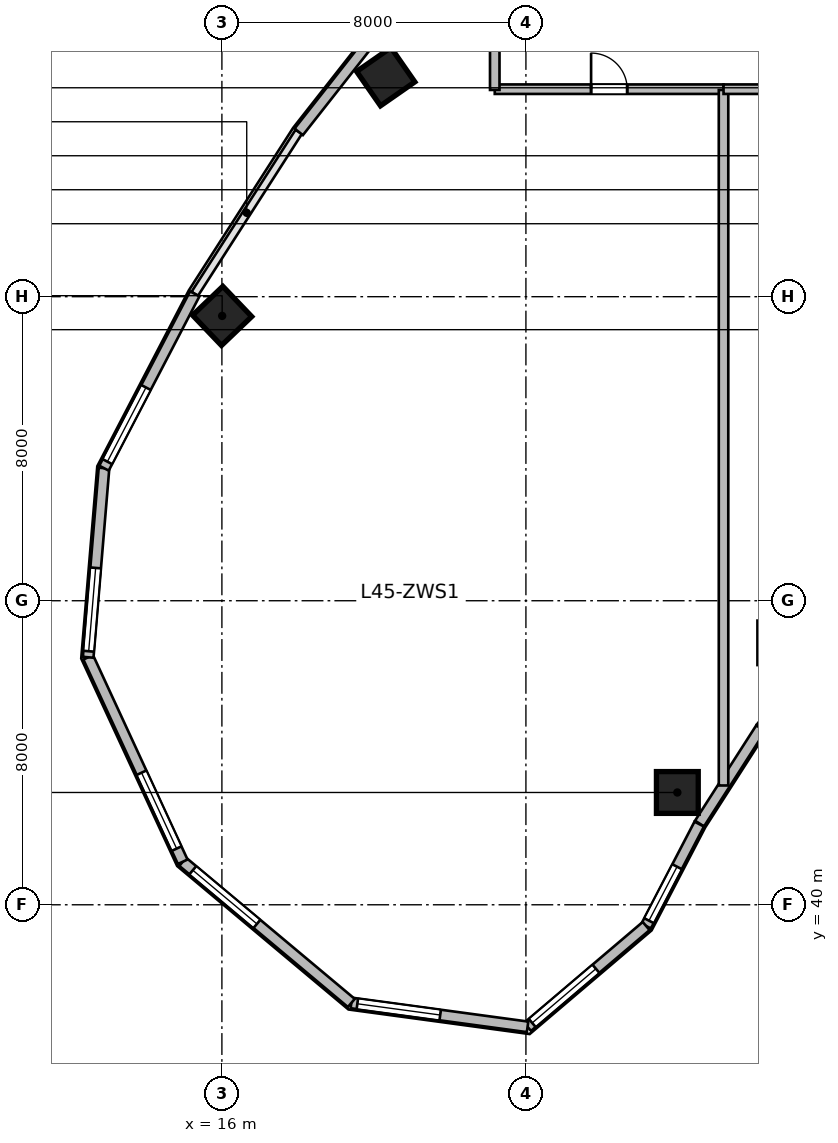
"""IFC4 building model, lengths in metres.
Left out: names, types, materials, properties, quantities, classifications, styles, units other than length and angle.
Written with IfcOpenShell. Run it as: python <this file> out.ifc"""

import sys

from ifc_helpers import new_model, si_unit, direction, frame, frame_2d, origin, origin_2d, place, context, subcontext, project, spatial, rectangle, circle, extrude, source, transform, mapped, element, fill, save


model = new_model("IFC4")
c1 = context("Model", 3, precision=1e-05, world=origin(), true_north=direction((0.0, 1.0)))
c2 = subcontext(c1, "Body", "Model", "MODEL_VIEW")
j1 = project(units=[si_unit("LENGTHUNIT", "METRE"), si_unit("PLANEANGLEUNIT", "RADIAN")], contexts=[c1])
p1 = place(None, origin())
s1 = spatial("IfcSite", under=j1, at=p1, CompositionType="ELEMENT")
p2 = place(p1, origin())
s2 = spatial("IfcBuilding", under=s1, at=p2, CompositionType="ELEMENT")
p3 = place(p2, frame((0.0, 0.0, 185.7)))
s3 = spatial("IfcBuildingStorey", under=s2, at=p3, CompositionType="ELEMENT", Elevation=185.7)
m1 = source(origin(), c2, "Body", "SweptSolid", [
    extrude(circle(Radius=0.55, at=origin_2d()), origin(), (0.0, 0.0, 1.0), 3.9),
])
p4 = place(p3, frame((27.985, 42.955, 0.0), z_axis=(0.0, 0.0, 1.0), x_axis=(-0.690756218984, 0.723087716626, 0.0)))
e1 = element("IfcColumn", 1, at=p4, inside=s3, PredefinedType="COLUMN", context=c2, shape_type="MappedRepresentation", body=[
    mapped(m1, transform((0.0, 0.0, 0.0), scale=1.0)),
])
m2 = source(origin(), c2, "Body", "SweptSolid", [
    extrude(rectangle(XDim=1.1, YDim=1.1, at=origin_2d()), origin(), (0.0, 0.0, 1.0), 3.9),
])
for number, where, z_axis, x_axis in (
    (2, (16.007, 55.494, 0.0), (0.0, 0.0, 1.0), (-0.691, 0.723, 0.0)),
    (3, (20.311, 61.789, 0.0), (0.0, 0.0, 1.0), (-0.571, 0.821, 0.0)),
):
    element("IfcColumn", number, at=place(p3, frame(where, z_axis=z_axis, x_axis=x_axis)), inside=s3, PredefinedType="COLUMN", context=c2, shape_type="MappedRepresentation", body=[
        mapped(m2, transform((0.0, 0.0, 0.0), scale=1.0)),
    ])
m3 = source(origin(), c2, "Body", "SweptSolid", [
    extrude(rectangle(XDim=2.897, YDim=0.28, at=frame_2d((1.448, 0.0))), origin(), (0.0, 0.0, 1.0), 3.58),
])
p5 = place(p3, frame((31.979, 46.936, 0.0), z_axis=(0.0, 0.0, 1.0), x_axis=(-0.618167636915, -0.786046291685, 0.0)))
e4 = element("IfcWall", 4, at=p5, inside=s3, PredefinedType="SOLIDWALL", context=c2, shape_type="MappedRepresentation", body=[
    mapped(m3, transform((0.0, 0.0, 0.0), scale=1.0)),
])
m4 = source(origin(), c2, "Body", "SweptSolid", [
    extrude(rectangle(XDim=2.981, YDim=0.28, at=frame_2d((1.49, 0.0))), origin(), (0.0, 0.0, 1.0), 3.58),
])
p6 = place(p3, frame((30.179, 44.645, 0.0), z_axis=(0.0, 0.0, 1.0), x_axis=(-0.540194451908, -0.841540227278, 0.0)))
e5 = element("IfcWall", 5, at=p6, inside=s3, PredefinedType="SOLIDWALL", context=c2, shape_type="MappedRepresentation", body=[
    mapped(m4, transform((0.0, 0.0, 0.0), scale=1.0)),
])
m5 = source(origin(), c2, "Body", "SweptSolid", [
    extrude(rectangle(XDim=3.024, YDim=0.28, at=frame_2d((1.512, 0.0))), origin(), (0.0, 0.0, 1.0), 3.58),
])
p7 = place(p3, frame((28.561, 42.123, 0.0), z_axis=(0.0, 0.0, 1.0), x_axis=(-0.461718746531, -0.887026380161, 0.0)))
e6 = element("IfcWall", 6, at=p7, inside=s3, PredefinedType="SOLIDWALL", context=c2, shape_type="MappedRepresentation", body=[
    mapped(m5, transform((0.0, 0.0, 0.0), scale=1.0)),
])
p8 = place(p7, frame((1.264, 0.0, 0.95)))
e7 = element("IfcOpeningElement", 7, at=p8, cuts=e6, PredefinedType="OPENING", context=c2, shape_type="SweptSolid", body=[
    extrude(rectangle(XDim=1.6, YDim=1.9, at=frame_2d((0.8, 0.95))), frame((0.0, 0.15, 0.0), z_axis=(0.0, -1.0, 0.0), x_axis=(1.0, 0.0, 0.0)), (0.0, 0.0, 1.0), 0.3),
])
m6 = source(origin(), c2, "Body", "SweptSolid", [
    extrude(rectangle(XDim=4.096, YDim=0.28, at=frame_2d((2.048, 0.0))), origin(), (0.0, 0.0, 1.0), 3.58),
])
p9 = place(p3, frame((27.164, 39.44, 0.0), z_axis=(0.0, 0.0, 1.0), x_axis=(-0.761926081737, -0.647663991564, 0.0)))
e8 = element("IfcWall", 8, at=p9, inside=s3, PredefinedType="SOLIDWALL", context=c2, shape_type="MappedRepresentation", body=[
    mapped(m6, transform((0.0, 0.0, 0.0), scale=1.0)),
])
p10 = place(p9, frame((1.736, 0.0, 0.95)))
e9 = element("IfcOpeningElement", 9, at=p10, cuts=e8, PredefinedType="OPENING", context=c2, shape_type="SweptSolid", body=[
    extrude(rectangle(XDim=2.2, YDim=2.1, at=frame_2d((1.1, 1.05))), frame((0.0, 0.15, 0.0), z_axis=(0.0, -1.0, 0.0), x_axis=(1.0, 0.0, 0.0)), (0.0, 0.0, 1.0), 0.3),
])
m7 = source(origin(), c2, "Body", "SweptSolid", [
    extrude(rectangle(XDim=4.68, YDim=0.28, at=frame_2d((2.34, 0.0))), origin(), (0.0, 0.0, 1.0), 3.58),
])
p11 = place(p3, frame((24.043, 36.788, 0.0), z_axis=(0.0, 0.0, 1.0), x_axis=(-0.990931146435, 0.134370618162, 0.0)))
e10 = element("IfcWall", 10, at=p11, inside=s3, PredefinedType="SOLIDWALL", context=c2, shape_type="MappedRepresentation", body=[
    mapped(m7, transform((0.0, 0.0, 0.0), scale=1.0)),
])
p12 = place(p11, frame((2.32, 0.0, 0.95)))
e11 = element("IfcOpeningElement", 11, at=p12, cuts=e10, PredefinedType="OPENING", context=c2, shape_type="SweptSolid", body=[
    extrude(rectangle(XDim=2.2, YDim=2.1, at=frame_2d((1.1, 1.05))), frame((0.0, 0.15, 0.0), z_axis=(0.0, -1.0, 0.0), x_axis=(1.0, 0.0, 0.0)), (0.0, 0.0, 1.0), 0.3),
])
m8 = source(origin(), c2, "Body", "SweptSolid", [
    extrude(rectangle(XDim=5.786, YDim=0.28, at=frame_2d((2.893, 0.0))), origin(), (0.0, 0.0, 1.0), 3.58),
])
p13 = place(p3, frame((19.406, 37.417, 0.0), z_axis=(0.0, 0.0, 1.0), x_axis=(-0.766711306852, 0.641992034176, 0.0)))
e12 = element("IfcWall", 12, at=p13, inside=s3, PredefinedType="SOLIDWALL", context=c2, shape_type="MappedRepresentation", body=[
    mapped(m8, transform((0.0, 0.0, 0.0), scale=1.0)),
])
p14 = place(p13, frame((3.24, 0.0, 0.95)))
e13 = element("IfcOpeningElement", 13, at=p14, cuts=e12, PredefinedType="OPENING", context=c2, shape_type="SweptSolid", body=[
    extrude(rectangle(XDim=2.2, YDim=2.1, at=frame_2d((1.1, 1.05))), frame((0.0, 0.15, 0.0), z_axis=(0.0, -1.0, 0.0), x_axis=(1.0, 0.0, 0.0)), (0.0, 0.0, 1.0), 0.3),
])
m9 = source(origin(), c2, "Body", "SweptSolid", [
    extrude(rectangle(XDim=5.927, YDim=0.28, at=frame_2d((2.964, 0.0))), origin(), (0.0, 0.0, 1.0), 3.58),
])
p15 = place(p3, frame((14.969, 41.131, 0.0), z_axis=(0.0, 0.0, 1.0), x_axis=(-0.419656204795, 0.907683132914, 0.0)))
e14 = element("IfcWall", 14, at=p15, inside=s3, PredefinedType="SOLIDWALL", context=c2, shape_type="MappedRepresentation", body=[
    mapped(m9, transform((0.0, 0.0, 0.0), scale=1.0)),
])
p16 = place(p15, frame((0.382, 0.0, 0.95)))
e15 = element("IfcOpeningElement", 15, at=p16, cuts=e14, PredefinedType="OPENING", context=c2, shape_type="SweptSolid", body=[
    extrude(rectangle(XDim=2.2, YDim=2.1, at=frame_2d((1.1, 1.05))), frame((0.0, 0.15, 0.0), z_axis=(0.0, -1.0, 0.0), x_axis=(1.0, 0.0, 0.0)), (0.0, 0.0, 1.0), 0.3),
])
m10 = source(origin(), c2, "Body", "SweptSolid", [
    extrude(rectangle(XDim=4.994, YDim=0.28, at=frame_2d((2.497, 0.0))), origin(), (0.0, 0.0, 1.0), 3.58),
])
p17 = place(p3, frame((12.481, 46.512, 0.0), z_axis=(0.0, 0.0, 1.0), x_axis=(0.083344839916, 0.996520766296, 0.0)))
e16 = element("IfcWall", 16, at=p17, inside=s3, PredefinedType="SOLIDWALL", context=c2, shape_type="MappedRepresentation", body=[
    mapped(m10, transform((0.0, 0.0, 0.0), scale=1.0)),
])
p18 = place(p17, frame((0.16, 0.0, 0.95)))
e17 = element("IfcOpeningElement", 17, at=p18, cuts=e16, PredefinedType="OPENING", context=c2, shape_type="SweptSolid", body=[
    extrude(rectangle(XDim=2.2, YDim=2.1, at=frame_2d((1.1, 1.05))), frame((0.0, 0.15, 0.0), z_axis=(0.0, -1.0, 0.0), x_axis=(1.0, 0.0, 0.0)), (0.0, 0.0, 1.0), 0.3),
])
m11 = source(origin(), c2, "Body", "SweptSolid", [
    extrude(rectangle(XDim=5.171, YDim=0.28, at=frame_2d((2.585, 0.0))), origin(), (0.0, 0.0, 1.0), 3.58),
])
p19 = place(p3, frame((12.898, 51.489, 0.0), z_axis=(0.0, 0.0, 1.0), x_axis=(0.461752581363, 0.887008767491, 0.0)))
e18 = element("IfcWall", 18, at=p19, inside=s3, PredefinedType="SOLIDWALL", context=c2, shape_type="MappedRepresentation", body=[
    mapped(m11, transform((0.0, 0.0, 0.0), scale=1.0)),
])
p20 = place(p19, frame((0.193, 0.0, 0.95)))
e19 = element("IfcOpeningElement", 19, at=p20, cuts=e18, PredefinedType="OPENING", context=c2, shape_type="SweptSolid", body=[
    extrude(rectangle(XDim=2.2, YDim=2.1, at=frame_2d((1.1, 1.05))), frame((0.0, 0.15, 0.0), z_axis=(0.0, -1.0, 0.0), x_axis=(1.0, 0.0, 0.0)), (0.0, 0.0, 1.0), 0.3),
])
m12 = source(origin(), c2, "Body", "SweptSolid", [
    extrude(rectangle(XDim=4.922, YDim=0.28, at=frame_2d((2.461, 0.0))), origin(), (0.0, 0.0, 1.0), 3.58),
])
p21 = place(p3, frame((18.021, 60.338, 0.0), z_axis=(0.0, 0.0, 1.0), x_axis=(0.61817639101, 0.786039407153, 0.0)))
e20 = element("IfcWall", 20, at=p21, inside=s3, PredefinedType="SOLIDWALL", context=c2, shape_type="MappedRepresentation", body=[
    mapped(m12, transform((0.0, 0.0, 0.0), scale=1.0)),
])
m13 = source(origin(), c2, "Body", "SweptSolid", [
    extrude(rectangle(XDim=6.02, YDim=0.25, at=frame_2d((3.01, 0.0))), origin(), (0.0, 0.0, 1.0), 3.58),
])
p22 = place(p3, frame((23.18, 61.46, 0.0), z_axis=(0.0, 0.0, 1.0), x_axis=(1.0, 0.0, 0.0)))
e21 = element("IfcWall", 21, at=p22, inside=s3, PredefinedType="PARTITIONING", context=c2, shape_type="MappedRepresentation", body=[
    mapped(m13, transform((0.0, 0.0, 0.0), scale=1.0)),
])
p23 = place(p22, frame((2.535, 0.0, 0.0)))
e22 = element("IfcOpeningElement", 22, at=p23, cuts=e21, PredefinedType="OPENING", context=c2, shape_type="SweptSolid", body=[
    extrude(rectangle(XDim=0.95, YDim=2.1, at=frame_2d((0.475, 1.05))), frame((0.0, 0.135, 0.0), z_axis=(0.0, -1.0, 0.0), x_axis=(1.0, 0.0, 0.0)), (0.0, 0.0, 1.0), 0.27),
])
m14 = source(origin(), c2, "Body", "SweptSolid", [
    extrude(rectangle(XDim=18.301, YDim=0.25, at=frame_2d((9.15, 0.0))), origin(), (0.0, 0.0, 1.0), 2.872),
])
p24 = place(p3, frame((29.2, 43.139, 0.0), z_axis=(0.0, 0.0, 1.0), x_axis=(0.0, 1.0, 0.0)))
e23 = element("IfcWall", 23, at=p24, inside=s3, PredefinedType="PARTITIONING", context=c2, shape_type="MappedRepresentation", body=[
    mapped(m14, transform((0.0, 0.0, 0.0), scale=1.0)),
])
m15 = source(origin(), c2, "Body", "SweptSolid", [
    extrude(rectangle(XDim=5.2, YDim=0.25, at=frame_2d((2.6, 0.0))), origin(), (0.0, 0.0, 1.0), 3.58),
])
p25 = place(p3, frame((29.2, 61.46, 0.0), z_axis=(0.0, 0.0, 1.0), x_axis=(1.0, 0.0, 0.0)))
e24 = element("IfcWall", 24, at=p25, inside=s3, PredefinedType="PARTITIONING", context=c2, shape_type="MappedRepresentation", body=[
    mapped(m15, transform((0.0, 0.0, 0.0), scale=1.0)),
])
p26 = place(p25, frame((2.125, 0.0, 0.0)))
e25 = element("IfcOpeningElement", 25, at=p26, cuts=e24, PredefinedType="OPENING", context=c2, shape_type="SweptSolid", body=[
    extrude(rectangle(XDim=0.95, YDim=2.1, at=frame_2d((0.475, 1.05))), frame((0.0, 0.135, 0.0), z_axis=(0.0, -1.0, 0.0), x_axis=(1.0, 0.0, 0.0)), (0.0, 0.0, 1.0), 0.27),
])
m16 = source(origin(), c2, "Body", "SweptSolid", [
    extrude(rectangle(XDim=2.62, YDim=0.25, at=frame_2d((1.31, 0.0))), origin(), (0.0, 0.0, 1.0), 3.58),
])
p27 = place(p3, frame((23.18, 61.44, 0.0), z_axis=(0.0, 0.0, 1.0), x_axis=(0.0, 1.0, 0.0)))
e26 = element("IfcWall", 26, at=p27, inside=s3, PredefinedType="PARTITIONING", context=c2, shape_type="MappedRepresentation", body=[
    mapped(m16, transform((0.0, 0.0, 0.0), scale=1.0)),
])
m17 = source(origin(), c2, "Body", "SweptSolid", [
    extrude(rectangle(XDim=1.6, YDim=1.9, at=frame_2d((0.8, 0.95))), frame((0.0, 0.03, 0.0), z_axis=(0.0, -1.0, 0.0), x_axis=(1.0, 0.0, 0.0)), (0.0, 0.0, 1.0), 0.06),
])
p28 = place(p8, origin())
e27 = element("IfcWindow", 27, at=p28, inside=s3, PartitioningType="SINGLE_PANEL", PredefinedType="WINDOW", context=c2, shape_type="MappedRepresentation", body=[
    mapped(m17, transform((0.0, 0.0, 0.0), scale=1.0)),
])
fill(e7, e27)
m18 = source(origin(), c2, "Body", "SweptSolid", [
    extrude(rectangle(XDim=2.2, YDim=2.1, at=frame_2d((1.1, 1.05))), frame((0.0, 0.03, 0.0), z_axis=(0.0, -1.0, 0.0), x_axis=(1.0, 0.0, 0.0)), (0.0, 0.0, 1.0), 0.06),
])
p29 = place(p10, origin())
e28 = element("IfcWindow", 28, at=p29, inside=s3, PartitioningType="TRIPLE_PANEL_VERTICAL", PredefinedType="WINDOW", context=c2, shape_type="MappedRepresentation", body=[
    mapped(m18, transform((0.0, 0.0, 0.0), scale=1.0)),
])
fill(e9, e28)
p30 = place(p12, origin())
e29 = element("IfcWindow", 29, at=p30, inside=s3, PartitioningType="TRIPLE_PANEL_VERTICAL", PredefinedType="WINDOW", context=c2, shape_type="MappedRepresentation", body=[
    mapped(m18, transform((0.0, 0.0, 0.0), scale=1.0)),
])
fill(e11, e29)
p31 = place(p14, origin())
e30 = element("IfcWindow", 30, at=p31, inside=s3, PartitioningType="TRIPLE_PANEL_VERTICAL", PredefinedType="WINDOW", context=c2, shape_type="MappedRepresentation", body=[
    mapped(m18, transform((0.0, 0.0, 0.0), scale=1.0)),
])
fill(e13, e30)
p32 = place(p16, origin())
e31 = element("IfcWindow", 31, at=p32, inside=s3, PartitioningType="TRIPLE_PANEL_VERTICAL", PredefinedType="WINDOW", context=c2, shape_type="MappedRepresentation", body=[
    mapped(m18, transform((0.0, 0.0, 0.0), scale=1.0)),
])
fill(e15, e31)
p33 = place(p18, origin())
e32 = element("IfcWindow", 32, at=p33, inside=s3, PartitioningType="TRIPLE_PANEL_VERTICAL", PredefinedType="WINDOW", context=c2, shape_type="MappedRepresentation", body=[
    mapped(m18, transform((0.0, 0.0, 0.0), scale=1.0)),
])
fill(e17, e32)
p34 = place(p20, origin())
e33 = element("IfcWindow", 33, at=p34, inside=s3, PartitioningType="TRIPLE_PANEL_VERTICAL", PredefinedType="WINDOW", context=c2, shape_type="MappedRepresentation", body=[
    mapped(m18, transform((0.0, 0.0, 0.0), scale=1.0)),
])
fill(e19, e33)
m19 = source(origin(), c2, "Body", "SweptSolid", [
    extrude(rectangle(XDim=0.95, YDim=2.1, at=frame_2d((0.475, 1.05))), frame((0.0, 0.025, 0.0), z_axis=(0.0, -1.0, 0.0), x_axis=(1.0, 0.0, 0.0)), (0.0, 0.0, 1.0), 0.05),
])
p35 = place(p23, origin())
e34 = element("IfcDoor", 34, at=p35, inside=s3, OperationType="SINGLE_SWING_LEFT", PredefinedType="DOOR", context=c2, shape_type="MappedRepresentation", body=[
    mapped(m19, transform((0.0, 0.0, 0.0), scale=1.0)),
])
fill(e22, e34)
save(model, sys.argv[1])
